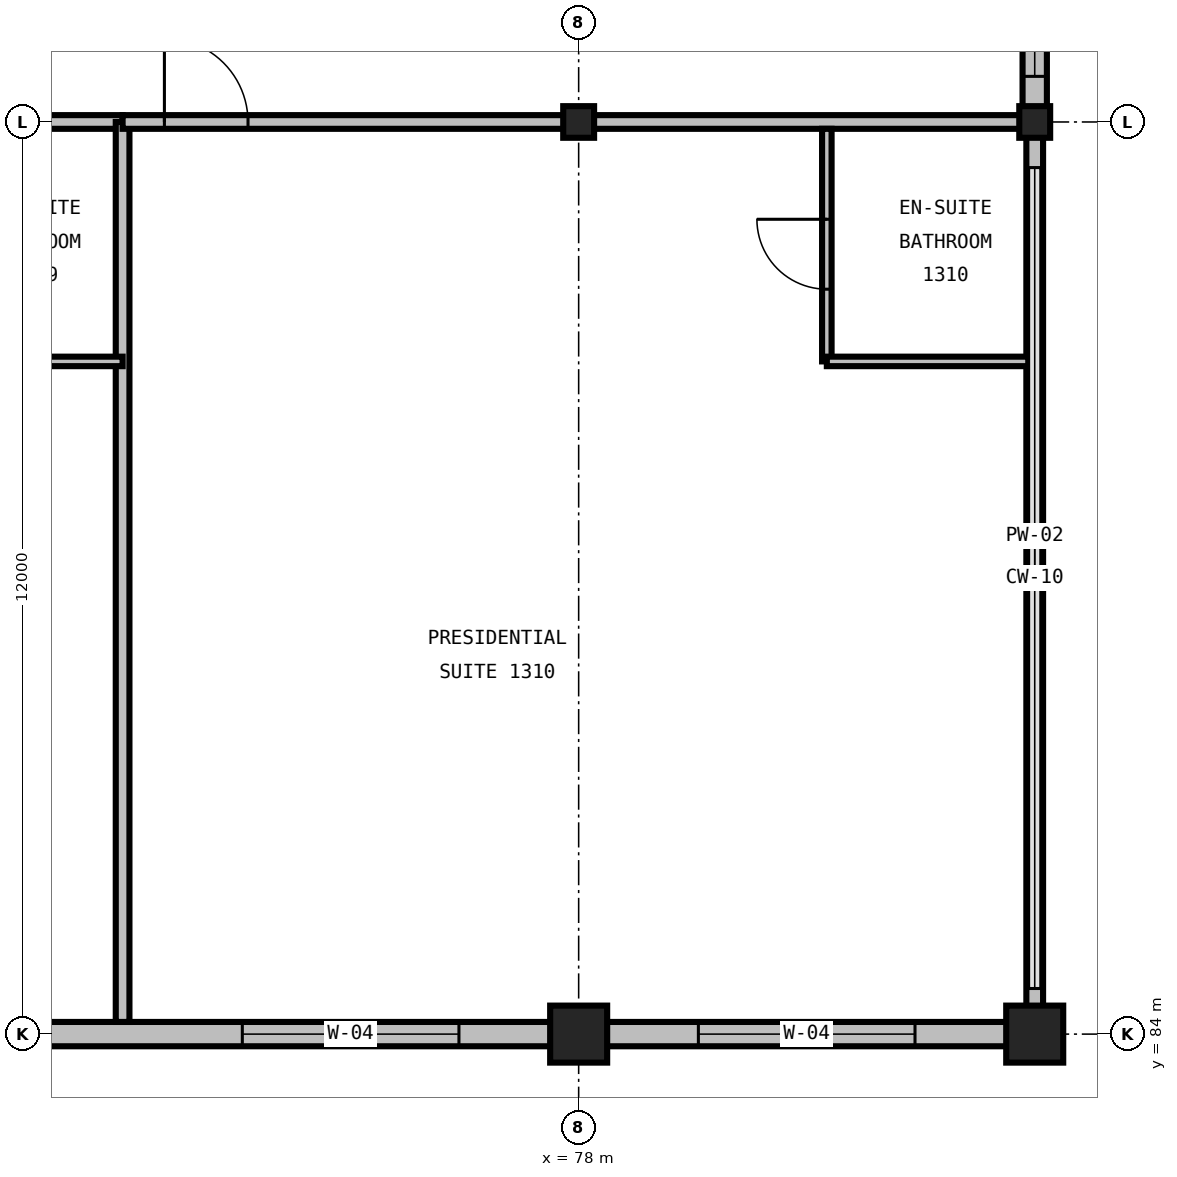
"""IFC4 building model, lengths in metres.
Left out: names, types, materials, properties, quantities, classifications, styles, units other than length and angle.
Written with IfcOpenShell. Run it as: python <this file> out.ifc"""

import sys

from ifc_helpers import new_model, si_unit, direction, frame, frame_2d, origin, origin_2d, place, context, subcontext, project, spatial, rectangle, i_section, extrude, element, fill, save


model = new_model("IFC4")
c1 = context("Model", 3, precision=1e-05, world=origin(), true_north=direction((0.0, 1.0)))
c2 = subcontext(c1, "Body", "Model", "MODEL_VIEW")
j1 = project(units=[si_unit("LENGTHUNIT", "METRE"), si_unit("PLANEANGLEUNIT", "RADIAN")], contexts=[c1])
p1 = place(None, origin())
s1 = spatial("IfcSite", under=j1, at=p1, CompositionType="ELEMENT")
p2 = place(p1, origin())
s2 = spatial("IfcBuilding", under=s1, at=p2, CompositionType="ELEMENT")
p3 = place(p2, frame((0.0, 0.0, 56.4)))
s3 = spatial("IfcBuildingStorey", under=s2, at=p3, CompositionType="ELEMENT", Elevation=56.4)
p4 = place(p3, frame((78.0, 84.0, 0.0), z_axis=(0.0, 0.0, 1.0), x_axis=(1.0, 0.0, 0.0)))
e1 = element("IfcColumn", 1, at=p4, inside=s3, PredefinedType="COLUMN", context=c2, shape_type="SweptSolid", body=[
    extrude(rectangle(XDim=0.75, YDim=0.75, at=origin_2d()), origin(), (0.0, 0.0, 1.0), 3.6),
])
p5 = place(p3, frame((78.0, 96.0, 0.0), z_axis=(0.0, 0.0, 1.0), x_axis=(1.0, 0.0, 0.0)))
e2 = element("IfcColumn", 2, at=p5, inside=s3, PredefinedType="COLUMN", context=c2, shape_type="SweptSolid", body=[
    extrude(i_section(OverallWidth=0.406, OverallDepth=0.416, WebThickness=0.03, FlangeThickness=0.048, FilletRadius=0.031, at=origin_2d()), origin(), (0.0, 0.0, 1.0), 3.6),
])
p6 = place(p3, frame((84.0, 84.0, 0.0), z_axis=(0.0, 0.0, 1.0), x_axis=(1.0, 0.0, 0.0)))
e3 = element("IfcColumn", 3, at=p6, inside=s3, PredefinedType="COLUMN", context=c2, shape_type="SweptSolid", body=[
    extrude(rectangle(XDim=0.75, YDim=0.75, at=origin_2d()), origin(), (0.0, 0.0, 1.0), 3.6),
])
p7 = place(p3, frame((84.0, 96.0, 0.0), z_axis=(0.0, 0.0, 1.0), x_axis=(1.0, 0.0, 0.0)))
e4 = element("IfcColumn", 4, at=p7, inside=s3, PredefinedType="COLUMN", context=c2, shape_type="SweptSolid", body=[
    extrude(i_section(OverallWidth=0.406, OverallDepth=0.416, WebThickness=0.03, FlangeThickness=0.048, FilletRadius=0.031, at=origin_2d()), origin(), (0.0, 0.0, 1.0), 3.6),
])
p8 = place(p3, frame((66.0, 84.0, 0.0), z_axis=(0.0, 0.0, 1.0), x_axis=(1.0, 0.0, 0.0)))
e5 = element("IfcWall", 5, at=p8, inside=s3, PredefinedType="STANDARD", context=c2, shape_type="SweptSolid", body=[
    extrude(rectangle(XDim=12.0, YDim=0.32, at=frame_2d((6.0, 0.0))), origin(), (0.0, 0.0, 1.0), 2.536),
])
p9 = place(p8, frame((1.575, 0.0, 0.7)))
e6 = element("IfcOpeningElement", 6, at=p9, cuts=e5, PredefinedType="OPENING", context=c2, shape_type="SweptSolid", body=[
    extrude(rectangle(XDim=2.85, YDim=1.65, at=frame_2d((1.425, 0.825))), frame((0.0, 0.175, 0.0), z_axis=(0.0, -1.0, 0.0), x_axis=(1.0, 0.0, 0.0)), (0.0, 0.0, 1.0), 0.35),
])
p10 = place(p8, frame((7.575, 0.0, 0.7)))
e7 = element("IfcOpeningElement", 7, at=p10, cuts=e5, PredefinedType="OPENING", context=c2, shape_type="SweptSolid", body=[
    extrude(rectangle(XDim=2.85, YDim=1.65, at=frame_2d((1.425, 0.825))), frame((0.0, 0.175, 0.0), z_axis=(0.0, -1.0, 0.0), x_axis=(1.0, 0.0, 0.0)), (0.0, 0.0, 1.0), 0.35),
])
p11 = place(p3, frame((78.0, 84.0, 0.0), z_axis=(0.0, 0.0, 1.0), x_axis=(1.0, 0.0, 0.0)))
e8 = element("IfcWall", 8, at=p11, inside=s3, PredefinedType="STANDARD", context=c2, shape_type="SweptSolid", body=[
    extrude(rectangle(XDim=6.0, YDim=0.32, at=frame_2d((3.0, 0.0))), origin(), (0.0, 0.0, 1.0), 2.536),
])
p12 = place(p11, frame((1.575, 0.0, 0.7)))
e9 = element("IfcOpeningElement", 9, at=p12, cuts=e8, PredefinedType="OPENING", context=c2, shape_type="SweptSolid", body=[
    extrude(rectangle(XDim=2.85, YDim=1.65, at=frame_2d((1.425, 0.825))), frame((0.0, 0.175, 0.0), z_axis=(0.0, -1.0, 0.0), x_axis=(1.0, 0.0, 0.0)), (0.0, 0.0, 1.0), 0.35),
])
p13 = place(p3, frame((84.0, 84.0, 0.0), z_axis=(0.0, 0.0, 1.0), x_axis=(0.0, 1.0, 0.0)))
e10 = element("IfcWall", 10, at=p13, inside=s3, PredefinedType="PARAPET", context=c2, shape_type="SweptSolid", body=[
    extrude(rectangle(XDim=12.0, YDim=0.22, at=frame_2d((6.0, 0.0))), origin(), (0.0, 0.0, 1.0), 0.2),
])
p14 = place(p3, frame((84.0, 96.0, 0.0), z_axis=(0.0, 0.0, 1.0), x_axis=(0.0, 1.0, 0.0)))
e11 = element("IfcWall", 11, at=p14, inside=s3, PredefinedType="STANDARD", context=c2, shape_type="SweptSolid", body=[
    extrude(rectangle(XDim=9.0, YDim=0.32, at=frame_2d((4.5, 0.0))), origin(), (0.0, 0.0, 1.0), 2.981),
])
p15 = place(p14, frame((0.6, 0.0, 0.85)))
e12 = element("IfcOpeningElement", 12, at=p15, cuts=e11, PredefinedType="OPENING", context=c2, shape_type="SweptSolid", body=[
    extrude(rectangle(XDim=1.8, YDim=1.5, at=frame_2d((0.9, 0.75))), frame((0.0, 0.175, 0.0), z_axis=(0.0, -1.0, 0.0), x_axis=(1.0, 0.0, 0.0)), (0.0, 0.0, 1.0), 0.35),
])
p16 = place(p3, frame((66.0, 96.0, 0.0), z_axis=(0.0, 0.0, 1.0), x_axis=(1.0, 0.0, 0.0)))
e13 = element("IfcWall", 13, at=p16, inside=s3, PredefinedType="PARTITIONING", context=c2, shape_type="SweptSolid", body=[
    extrude(rectangle(XDim=6.0, YDim=0.18, at=frame_2d((3.0, 0.0))), origin(), (0.0, 0.0, 1.0), 2.664),
])
p17 = place(p16, frame((0.77, 0.0, 0.0)))
e14 = element("IfcOpeningElement", 14, at=p17, cuts=e13, PredefinedType="OPENING", context=c2, shape_type="SweptSolid", body=[
    extrude(rectangle(XDim=1.0, YDim=2.15, at=frame_2d((0.5, 1.075))), frame((0.0, 0.105, 0.0), z_axis=(0.0, -1.0, 0.0), x_axis=(1.0, 0.0, 0.0)), (0.0, 0.0, 1.0), 0.21),
])
p18 = place(p3, frame((72.0, 84.16, 0.0), z_axis=(0.0, 0.0, 1.0), x_axis=(0.0, 1.0, 0.0)))
e15 = element("IfcWall", 15, at=p18, inside=s3, PredefinedType="PARTITIONING", context=c2, shape_type="SweptSolid", body=[
    extrude(rectangle(XDim=11.84, YDim=0.18, at=frame_2d((5.92, 0.0))), origin(), (0.0, 0.0, 1.0), 3.29),
])
p19 = place(p3, frame((69.48, 92.85, 0.0), z_axis=(0.0, 0.0, 1.0), x_axis=(1.0, 0.0, 0.0)))
e16 = element("IfcWall", 16, at=p19, inside=s3, PredefinedType="PARTITIONING", context=c2, shape_type="SweptSolid", body=[
    extrude(rectangle(XDim=2.52, YDim=0.125, at=frame_2d((1.26, 0.0))), origin(), (0.0, 0.0, 1.0), 3.29),
])
p20 = place(p3, frame((72.0, 96.0, 0.0), z_axis=(0.0, 0.0, 1.0), x_axis=(1.0, 0.0, 0.0)))
e17 = element("IfcWall", 17, at=p20, inside=s3, PredefinedType="PARTITIONING", context=c2, shape_type="SweptSolid", body=[
    extrude(rectangle(XDim=11.915, YDim=0.18, at=frame_2d((5.957, 0.0))), origin(), (0.0, 0.0, 1.0), 2.664),
])
p21 = place(p20, frame((0.55, 0.0, 0.0)))
e18 = element("IfcOpeningElement", 18, at=p21, cuts=e17, PredefinedType="OPENING", context=c2, shape_type="SweptSolid", body=[
    extrude(rectangle(XDim=1.1, YDim=2.2, at=frame_2d((0.55, 1.1))), frame((0.0, 0.105, 0.0), z_axis=(0.0, -1.0, 0.0), x_axis=(1.0, 0.0, 0.0)), (0.0, 0.0, 1.0), 0.21),
])
p22 = place(p3, frame((81.265, 92.85, 0.0), z_axis=(0.0, 0.0, 1.0), x_axis=(0.0, 1.0, 0.0)))
e19 = element("IfcWall", 19, at=p22, inside=s3, PredefinedType="PARTITIONING", context=c2, shape_type="SweptSolid", body=[
    extrude(rectangle(XDim=3.06, YDim=0.125, at=frame_2d((1.53, 0.0))), origin(), (0.0, 0.0, 1.0), 3.29),
])
p23 = place(p22, frame((0.95, 0.0, 0.0)))
e20 = element("IfcOpeningElement", 20, at=p23, cuts=e19, PredefinedType="OPENING", context=c2, shape_type="SweptSolid", body=[
    extrude(rectangle(XDim=0.92, YDim=2.1, at=frame_2d((0.46, 1.05))), frame((0.0, 0.077, 0.0), z_axis=(0.0, -1.0, 0.0), x_axis=(1.0, 0.0, 0.0)), (0.0, 0.0, 1.0), 0.155),
])
p24 = place(p3, frame((81.265, 92.85, 0.0), z_axis=(0.0, 0.0, 1.0), x_axis=(1.0, 0.0, 0.0)))
e21 = element("IfcWall", 21, at=p24, inside=s3, PredefinedType="PARTITIONING", context=c2, shape_type="SweptSolid", body=[
    extrude(rectangle(XDim=2.65, YDim=0.125, at=frame_2d((1.325, 0.0))), origin(), (0.0, 0.0, 1.0), 3.29),
])
p25 = place(p10, origin())
e22 = element("IfcWindow", 22, at=p25, inside=s3, PartitioningType="TRIPLE_PANEL_VERTICAL", PredefinedType="WINDOW", context=c2, shape_type="SweptSolid", body=[
    extrude(rectangle(XDim=2.85, YDim=1.65, at=frame_2d((1.425, 0.825))), frame((0.0, 0.03, 0.0), z_axis=(0.0, -1.0, 0.0), x_axis=(1.0, 0.0, 0.0)), (0.0, 0.0, 1.0), 0.06),
])
fill(e7, e22)
p26 = place(p12, origin())
e23 = element("IfcWindow", 23, at=p26, inside=s3, PartitioningType="TRIPLE_PANEL_VERTICAL", PredefinedType="WINDOW", context=c2, shape_type="SweptSolid", body=[
    extrude(rectangle(XDim=2.85, YDim=1.65, at=frame_2d((1.425, 0.825))), frame((0.0, 0.03, 0.0), z_axis=(0.0, -1.0, 0.0), x_axis=(1.0, 0.0, 0.0)), (0.0, 0.0, 1.0), 0.06),
])
fill(e9, e23)
p27 = place(p15, origin())
e24 = element("IfcWindow", 24, at=p27, inside=s3, PartitioningType="SINGLE_PANEL", PredefinedType="WINDOW", context=c2, shape_type="SweptSolid", body=[
    extrude(rectangle(XDim=1.8, YDim=1.5, at=frame_2d((0.9, 0.75))), frame((0.0, 0.03, 0.0), z_axis=(0.0, -1.0, 0.0), x_axis=(1.0, 0.0, 0.0)), (0.0, 0.0, 1.0), 0.06),
])
fill(e12, e24)
p28 = place(p21, origin())
e25 = element("IfcDoor", 25, at=p28, inside=s3, OperationType="SINGLE_SWING_LEFT", PredefinedType="DOOR", context=c2, shape_type="SweptSolid", body=[
    extrude(rectangle(XDim=1.1, YDim=2.2, at=frame_2d((0.55, 1.1))), frame((0.0, 0.025, 0.0), z_axis=(0.0, -1.0, 0.0), x_axis=(1.0, 0.0, 0.0)), (0.0, 0.0, 1.0), 0.05),
])
fill(e18, e25)
p29 = place(p23, origin())
e26 = element("IfcDoor", 26, at=p29, inside=s3, OperationType="SINGLE_SWING_RIGHT", PredefinedType="DOOR", context=c2, shape_type="SweptSolid", body=[
    extrude(rectangle(XDim=0.92, YDim=2.1, at=frame_2d((0.46, 1.05))), frame((0.0, 0.025, 0.0), z_axis=(0.0, -1.0, 0.0), x_axis=(1.0, 0.0, 0.0)), (0.0, 0.0, 1.0), 0.05),
])
fill(e20, e26)
save(model, sys.argv[1])
